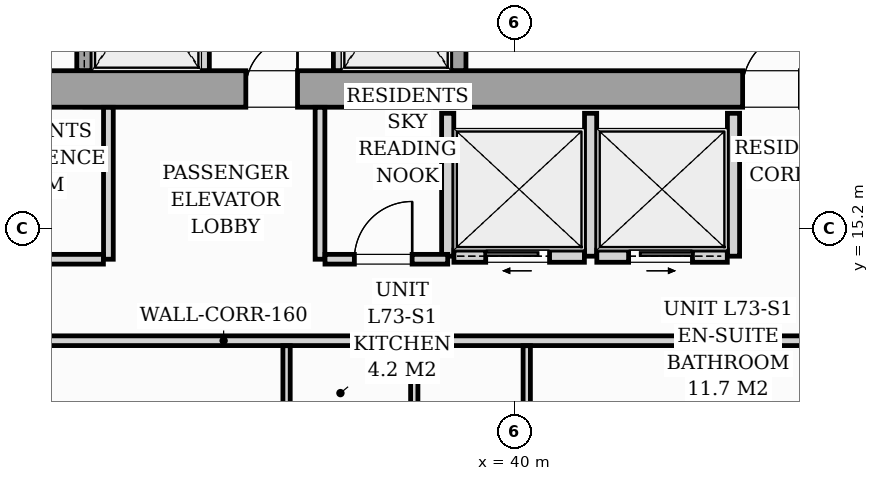
"""IFC4 building model, lengths in metres.
Left out: names, types, materials, properties, quantities, classifications, styles, units other than length and angle.
Written with IfcOpenShell. Run it as: python <this file> out.ifc"""

import sys

from ifc_helpers import new_model, si_unit, direction, frame, frame_2d, origin, origin_2d, place, context, subcontext, project, spatial, rectangle, i_section, extrude, source, transform, mapped, element, fill, save


model = new_model("IFC4")
c1 = context("Model", 3, precision=1e-05, world=origin(), true_north=direction((0.0, 1.0)))
c2 = subcontext(c1, "Body", "Model", "MODEL_VIEW")
j1 = project(units=[si_unit("LENGTHUNIT", "METRE"), si_unit("PLANEANGLEUNIT", "RADIAN")], contexts=[c1])
p1 = place(None, origin())
s1 = spatial("IfcSite", under=j1, at=p1, CompositionType="ELEMENT")
p2 = place(p1, origin())
s2 = spatial("IfcBuilding", under=s1, at=p2, CompositionType="ELEMENT")
p3 = place(p2, frame((0.0, 0.0, 252.9)))
s3 = spatial("IfcBuildingStorey", under=s2, at=p3, CompositionType="ELEMENT", Elevation=252.9)
m1 = source(origin(), c2, "Body", "SweptSolid", [
    extrude(i_section(OverallWidth=0.409, OverallDepth=0.425, WebThickness=0.033, FlangeThickness=0.052, FilletRadius=0.018, at=origin_2d()), origin(), (0.0, 0.0, 1.0), 3.296),
])
for number, where, z_axis, x_axis in (
    (1, (33.12, 17.4, 0.002), (0.0, 0.0, 1.0), (1.0, 0.0, 0.0)),
    (2, (38.88, 17.4, 0.002), (0.0, 0.0, 1.0), (1.0, 0.0, 0.0)),
):
    element("IfcColumn", number, at=place(p3, frame(where, z_axis=z_axis, x_axis=x_axis)), inside=s3, PredefinedType="PILASTER", context=c2, shape_type="MappedRepresentation", body=[
        mapped(m1, transform((0.0, 0.0, 0.0), scale=1.0)),
    ])
p4 = place(p3, frame((26.2, 17.5, 0.0), z_axis=(0.0, 0.0, 1.0), x_axis=(1.0, 0.0, 0.0)))
e3 = element("IfcWall", 3, at=p4, inside=s3, PredefinedType="SHEAR", context=c2, shape_type="SweptSolid", body=[
    extrude(rectangle(XDim=19.6, YDim=0.6, at=frame_2d((9.8, 0.0))), origin(), (0.0, 0.0, 1.0), 3.3),
])
p5 = place(p4, frame((0.95, 0.0, 0.0)))
e4 = element("IfcOpeningElement", 4, at=p5, cuts=e3, PredefinedType="OPENING", context=c2, shape_type="SweptSolid", body=[
    extrude(rectangle(XDim=0.95, YDim=2.06, at=frame_2d((0.475, 1.03))), frame((0.0, 0.31, 0.0), z_axis=(0.0, -1.0, 0.0), x_axis=(1.0, 0.0, 0.0)), (0.0, 0.0, 1.0), 0.62),
])
p6 = place(p4, frame((9.38, 0.0, 0.0)))
e5 = element("IfcOpeningElement", 5, at=p6, cuts=e3, PredefinedType="OPENING", context=c2, shape_type="SweptSolid", body=[
    extrude(rectangle(XDim=0.85, YDim=2.0, at=frame_2d((0.425, 1.0))), frame((0.0, 0.31, 0.0), z_axis=(0.0, -1.0, 0.0), x_axis=(1.0, 0.0, 0.0)), (0.0, 0.0, 1.0), 0.62),
])
p7 = place(p4, frame((17.55, 0.0, 0.0)))
e6 = element("IfcOpeningElement", 6, at=p7, cuts=e3, PredefinedType="OPENING", context=c2, shape_type="SweptSolid", body=[
    extrude(rectangle(XDim=0.95, YDim=2.06, at=frame_2d((0.475, 1.03))), frame((0.0, 0.31, 0.0), z_axis=(0.0, -1.0, 0.0), x_axis=(1.0, 0.0, 0.0)), (0.0, 0.0, 1.0), 0.62),
])
p8 = place(p3, frame((32.925, 17.802, 0.0), z_axis=(0.0, 0.0, 1.0), x_axis=(0.0, 1.0, 0.0)))
e7 = element("IfcWall", 7, at=p8, inside=s3, PredefinedType="SOLIDWALL", context=c2, shape_type="SweptSolid", body=[
    extrude(rectangle(XDim=2.646, YDim=0.25, at=frame_2d((1.323, 0.0))), origin(), (0.0, 0.0, 1.0), 3.3),
])
p9 = place(p8, frame((0.548, 0.0, 0.0)))
e8 = element("IfcOpeningElement", 8, at=p9, cuts=e7, PredefinedType="OPENING", context=c2, shape_type="SweptSolid", body=[
    extrude(rectangle(XDim=1.1, YDim=2.08, at=frame_2d((0.55, 1.04))), frame((0.0, 0.135, 0.0), z_axis=(0.0, -1.0, 0.0), x_axis=(1.0, 0.0, 0.0)), (0.0, 0.0, 1.0), 0.27),
])
for number, where, z_axis, x_axis in (
    (9, (34.9, 17.802, 0.0), (0.0, 0.0, 1.0), (0.0, 1.0, 0.0)),
    (10, (37.1, 17.802, 0.0), (0.0, 0.0, 1.0), (0.0, 1.0, 0.0)),
):
    element("IfcWall", number, at=place(p3, frame(where, z_axis=z_axis, x_axis=x_axis)), inside=s3, PredefinedType="PARTITIONING", context=c2, shape_type="SweptSolid", body=[
        extrude(rectangle(XDim=2.646, YDim=0.16, at=frame_2d((1.323, 0.0))), origin(), (0.0, 0.0, 1.0), 3.04),
    ])
p10 = place(p3, frame((39.075, 17.802, 0.0), z_axis=(0.0, 0.0, 1.0), x_axis=(0.0, 1.0, 0.0)))
e11 = element("IfcWall", 11, at=p10, inside=s3, PredefinedType="SOLIDWALL", context=c2, shape_type="SweptSolid", body=[
    extrude(rectangle(XDim=2.646, YDim=0.25, at=frame_2d((1.323, 0.0))), origin(), (0.0, 0.0, 1.0), 3.3),
])
p11 = place(p10, frame((0.548, 0.0, 0.0)))
e12 = element("IfcOpeningElement", 12, at=p11, cuts=e11, PredefinedType="OPENING", context=c2, shape_type="SweptSolid", body=[
    extrude(rectangle(XDim=1.1, YDim=2.08, at=frame_2d((0.55, 1.04))), frame((0.0, 0.135, 0.0), z_axis=(0.0, -1.0, 0.0), x_axis=(1.0, 0.0, 0.0)), (0.0, 0.0, 1.0), 0.27),
])
for number, where, z_axis, x_axis in (
    (13, (38.9, 14.75, 0.0), (0.0, 0.0, 1.0), (0.0, 1.0, 0.0)),
    (14, (41.25, 14.75, 0.0), (0.0, 0.0, 1.0), (0.0, 1.0, 0.0)),
    (15, (43.6, 14.75, 0.0), (0.0, 0.0, 1.0), (0.0, 1.0, 0.0)),
):
    element("IfcWall", number, at=place(p3, frame(where, z_axis=z_axis, x_axis=x_axis)), inside=s3, PredefinedType="PARTITIONING", context=c2, shape_type="SweptSolid", body=[
        extrude(rectangle(XDim=2.35, YDim=0.2, at=frame_2d((1.175, 0.0))), origin(), (0.0, 0.0, 1.0), 3.04),
    ])
p12 = place(p3, frame((39.002, 14.75, 0.0), z_axis=(0.0, 0.0, 1.0), x_axis=(1.0, 0.0, 0.0)))
e16 = element("IfcWall", 16, at=p12, inside=s3, PredefinedType="PARTITIONING", context=c2, shape_type="SweptSolid", body=[
    extrude(rectangle(XDim=2.146, YDim=0.2, at=frame_2d((1.073, 0.0))), origin(), (0.0, 0.0, 1.0), 3.04),
])
p13 = place(p12, frame((0.523, 0.0, 0.0)))
e17 = element("IfcOpeningElement", 17, at=p13, cuts=e16, PredefinedType="OPENING", context=c2, shape_type="SweptSolid", body=[
    extrude(rectangle(XDim=1.05, YDim=2.08, at=frame_2d((0.525, 1.04))), frame((0.0, 0.11, 0.0), z_axis=(0.0, -1.0, 0.0), x_axis=(1.0, 0.0, 0.0)), (0.0, 0.0, 1.0), 0.22),
])
p14 = place(p3, frame((41.352, 14.75, 0.0), z_axis=(0.0, 0.0, 1.0), x_axis=(1.0, 0.0, 0.0)))
e18 = element("IfcWall", 18, at=p14, inside=s3, PredefinedType="PARTITIONING", context=c2, shape_type="SweptSolid", body=[
    extrude(rectangle(XDim=2.146, YDim=0.2, at=frame_2d((1.073, 0.0))), origin(), (0.0, 0.0, 1.0), 3.04),
])
p15 = place(p14, frame((0.523, 0.0, 0.0)))
e19 = element("IfcOpeningElement", 19, at=p15, cuts=e18, PredefinedType="OPENING", context=c2, shape_type="SweptSolid", body=[
    extrude(rectangle(XDim=1.05, YDim=2.08, at=frame_2d((0.525, 1.04))), frame((0.0, 0.11, 0.0), z_axis=(0.0, -1.0, 0.0), x_axis=(1.0, 0.0, 0.0)), (0.0, 0.0, 1.0), 0.22),
])
p16 = place(p3, frame((24.55, 13.36, 0.0), z_axis=(0.0, 0.0, 1.0), x_axis=(1.0, 0.0, 0.0)))
e20 = element("IfcWall", 20, at=p16, inside=s3, PredefinedType="PARTITIONING", context=c2, shape_type="SweptSolid", body=[
    extrude(rectangle(XDim=21.33, YDim=0.16, at=frame_2d((10.665, 0.0))), origin(), (0.0, 0.0, 1.0), 2.605),
])
p17 = place(p16, frame((5.415, 0.0, 0.0)))
e21 = element("IfcOpeningElement", 21, at=p17, cuts=e20, PredefinedType="OPENING", context=c2, shape_type="SweptSolid", body=[
    extrude(rectangle(XDim=0.95, YDim=2.06, at=frame_2d((0.475, 1.03))), frame((0.0, 0.09, 0.0), z_axis=(0.0, -1.0, 0.0), x_axis=(1.0, 0.0, 0.0)), (0.0, 0.0, 1.0), 0.18),
])
p18 = place(p3, frame((40.2, 8.653, 0.0), z_axis=(0.0, 0.0, 1.0), x_axis=(0.0, 1.0, 0.0)))
e22 = element("IfcWall", 22, at=p18, inside=s3, PredefinedType="PARTITIONING", context=c2, shape_type="SweptSolid", body=[
    extrude(rectangle(XDim=4.625, YDim=0.12, at=frame_2d((2.312, 0.0))), origin(), (0.0, 0.0, 1.0), 3.04),
])
p19 = place(p18, frame((1.832, 0.0, 0.0)))
e23 = element("IfcOpeningElement", 23, at=p19, cuts=e22, PredefinedType="OPENING", context=c2, shape_type="SweptSolid", body=[
    extrude(rectangle(XDim=0.55, YDim=2.0, at=frame_2d((0.275, 1.0))), frame((0.0, 0.07, 0.0), z_axis=(0.0, -1.0, 0.0), x_axis=(1.0, 0.0, 0.0)), (0.0, 0.0, 1.0), 0.14),
])
for number, where, z_axis, x_axis in (
    (24, (38.35, 11.172, 0.0), (0.0, 0.0, 1.0), (0.0, 1.0, 0.0)),
    (25, (36.25, 11.172, 0.0), (0.0, 0.0, 1.0), (0.0, 1.0, 0.0)),
):
    element("IfcWall", number, at=place(p3, frame(where, z_axis=z_axis, x_axis=x_axis)), inside=s3, PredefinedType="PARTITIONING", context=c2, shape_type="SweptSolid", body=[
        extrude(rectangle(XDim=2.106, YDim=0.12, at=frame_2d((1.053, 0.0))), origin(), (0.0, 0.0, 1.0), 3.04),
    ])
p20 = place(p3, frame((33.32, 14.7, 0.0), z_axis=(0.0, 0.0, 1.0), x_axis=(0.0, 1.0, 0.0)))
e26 = element("IfcWall", 26, at=p20, inside=s3, PredefinedType="PARTITIONING", context=c2, shape_type="SweptSolid", body=[
    extrude(rectangle(XDim=2.498, YDim=0.16, at=frame_2d((1.249, 0.0))), origin(), (0.0, 0.0, 1.0), 3.04),
])
p21 = place(p3, frame((28.442, 14.7, 0.0), z_axis=(0.0, 0.0, 1.0), x_axis=(1.0, 0.0, 0.0)))
e27 = element("IfcWall", 27, at=p21, inside=s3, PredefinedType="PARTITIONING", context=c2, shape_type="SweptSolid", body=[
    extrude(rectangle(XDim=4.796, YDim=0.16, at=frame_2d((2.398, 0.0))), origin(), (0.0, 0.0, 1.0), 2.605),
])
p22 = place(p21, frame((1.923, 0.0, 0.0)))
e28 = element("IfcOpeningElement", 28, at=p22, cuts=e27, PredefinedType="OPENING", context=c2, shape_type="SweptSolid", body=[
    extrude(rectangle(XDim=0.95, YDim=2.06, at=frame_2d((0.475, 1.03))), frame((0.0, 0.09, 0.0), z_axis=(0.0, -1.0, 0.0), x_axis=(1.0, 0.0, 0.0)), (0.0, 0.0, 1.0), 0.18),
])
p23 = place(p3, frame((36.8, 14.7, 0.0), z_axis=(0.0, 0.0, 1.0), x_axis=(0.0, 1.0, 0.0)))
e29 = element("IfcWall", 29, at=p23, inside=s3, PredefinedType="PARTITIONING", context=c2, shape_type="SweptSolid", body=[
    extrude(rectangle(XDim=2.498, YDim=0.16, at=frame_2d((1.249, 0.0))), origin(), (0.0, 0.0, 1.0), 3.04),
])
p24 = place(p3, frame((36.882, 14.7, 0.0), z_axis=(0.0, 0.0, 1.0), x_axis=(1.0, 0.0, 0.0)))
e30 = element("IfcWall", 30, at=p24, inside=s3, PredefinedType="PARTITIONING", context=c2, shape_type="SweptSolid", body=[
    extrude(rectangle(XDim=2.018, YDim=0.16, at=frame_2d((1.009, 0.0))), origin(), (0.0, 0.0, 1.0), 3.04),
])
p25 = place(p24, frame((0.483, 0.0, 0.0)))
e31 = element("IfcOpeningElement", 31, at=p25, cuts=e30, PredefinedType="OPENING", context=c2, shape_type="SweptSolid", body=[
    extrude(rectangle(XDim=0.95, YDim=2.06, at=frame_2d((0.475, 1.03))), frame((0.0, 0.09, 0.0), z_axis=(0.0, -1.0, 0.0), x_axis=(1.0, 0.0, 0.0)), (0.0, 0.0, 1.0), 0.18),
])
m2 = source(origin(), c2, "Body", "SweptSolid", [
    extrude(rectangle(XDim=0.85, YDim=2.0, at=frame_2d((0.425, 1.0))), frame((0.0, 0.025, 0.0), z_axis=(0.0, -1.0, 0.0), x_axis=(1.0, 0.0, 0.0)), (0.0, 0.0, 1.0), 0.05),
])
p26 = place(p6, origin())
e32 = element("IfcDoor", 32, at=p26, inside=s3, OperationType="SINGLE_SWING_RIGHT", PredefinedType="DOOR", context=c2, shape_type="MappedRepresentation", body=[
    mapped(m2, transform((0.0, 0.0, 0.0), scale=1.0)),
])
fill(e5, e32)
m3 = source(origin(), c2, "Body", "SweptSolid", [
    extrude(rectangle(XDim=0.95, YDim=2.06, at=frame_2d((0.475, 1.03))), frame((0.0, 0.025, 0.0), z_axis=(0.0, -1.0, 0.0), x_axis=(1.0, 0.0, 0.0)), (0.0, 0.0, 1.0), 0.05),
])
p27 = place(p7, origin())
e33 = element("IfcDoor", 33, at=p27, inside=s3, OperationType="SINGLE_SWING_RIGHT", PredefinedType="DOOR", context=c2, shape_type="MappedRepresentation", body=[
    mapped(m3, transform((0.0, 0.0, 0.0), scale=1.0)),
])
fill(e6, e33)
m4 = source(origin(), c2, "Body", "SweptSolid", [
    extrude(rectangle(XDim=1.05, YDim=2.08, at=frame_2d((0.525, 1.04))), frame((0.0, 0.025, 0.0), z_axis=(0.0, -1.0, 0.0), x_axis=(1.0, 0.0, 0.0)), (0.0, 0.0, 1.0), 0.05),
])
p28 = place(p13, origin())
e34 = element("IfcDoor", 34, at=p28, inside=s3, OperationType="SLIDING_TO_LEFT", PredefinedType="DOOR", context=c2, shape_type="MappedRepresentation", body=[
    mapped(m4, transform((0.0, 0.0, 0.0), scale=1.0)),
])
fill(e17, e34)
p29 = place(p15, origin())
e35 = element("IfcDoor", 35, at=p29, inside=s3, OperationType="SLIDING_TO_RIGHT", PredefinedType="DOOR", context=c2, shape_type="MappedRepresentation", body=[
    mapped(m4, transform((0.0, 0.0, 0.0), scale=1.0)),
])
fill(e19, e35)
m5 = source(origin(), c2, "Body", "SweptSolid", [
    extrude(rectangle(XDim=0.95, YDim=2.06, at=frame_2d((0.475, 1.03))), frame((0.0, 0.025, 0.0), z_axis=(0.0, -1.0, 0.0), x_axis=(1.0, 0.0, 0.0)), (0.0, 0.0, 1.0), 0.05),
])
p30 = place(p25, origin())
e36 = element("IfcDoor", 36, at=p30, inside=s3, OperationType="SINGLE_SWING_RIGHT", PredefinedType="DOOR", context=c2, shape_type="MappedRepresentation", body=[
    mapped(m5, transform((0.0, 0.0, 0.0), scale=1.0)),
])
fill(e31, e36)
save(model, sys.argv[1])
